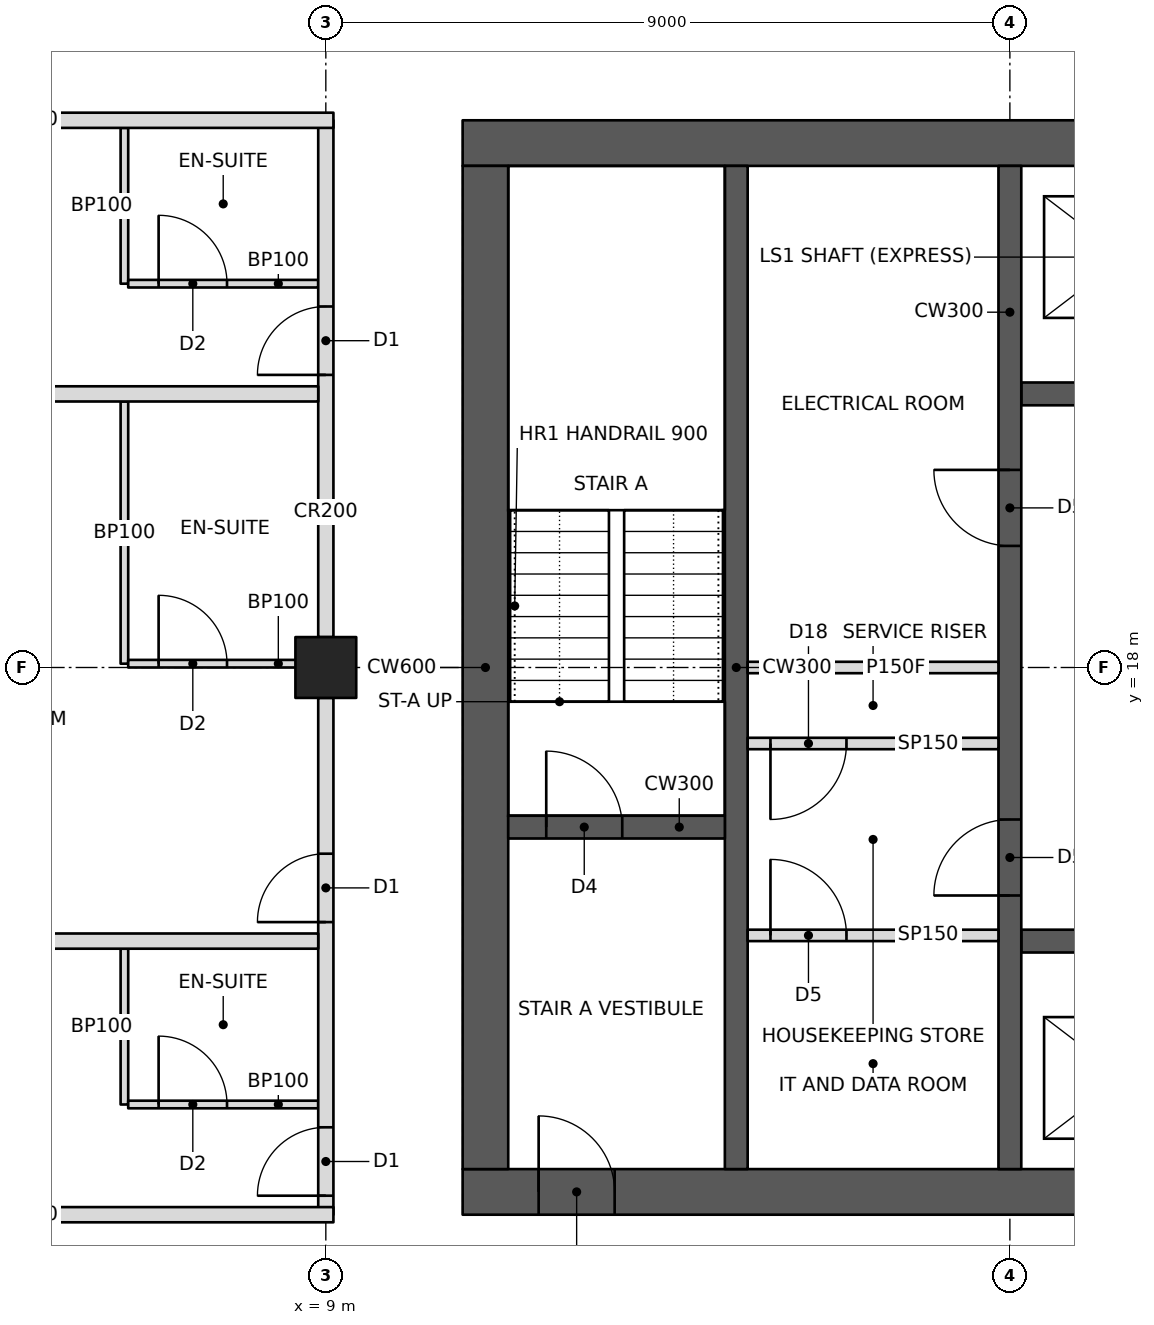
"""IFC4 building model, lengths in metres.
Left out: names, types, materials, properties, quantities, classifications, styles, units other than length and angle.
Written with IfcOpenShell. Run it as: python <this file> out.ifc"""

import sys

from ifc_helpers import new_model, si_unit, direction, frame, frame_2d, origin, origin_2d, place, context, subcontext, project, spatial, rectangle, hollow_rectangle, extrude, element, fill, save


model = new_model("IFC4")
c1 = context("Model", 3, precision=1e-05, world=origin(), true_north=direction((0.0, 1.0)))
c2 = subcontext(c1, "Body", "Model", "MODEL_VIEW")
j1 = project(units=[si_unit("LENGTHUNIT", "METRE"), si_unit("PLANEANGLEUNIT", "RADIAN")], contexts=[c1])
p1 = place(None, origin())
s1 = spatial("IfcSite", under=j1, at=p1, CompositionType="ELEMENT")
p2 = place(p1, origin())
s2 = spatial("IfcBuilding", under=s1, at=p2, CompositionType="ELEMENT")
p3 = place(p2, frame((0.0, 0.0, 82.4)))
s3 = spatial("IfcBuildingStorey", under=s2, at=p3, CompositionType="ELEMENT", Elevation=82.4)
p4 = place(p3, frame((9.0, 18.0, 0.0), z_axis=(0.0, 0.0, 1.0), x_axis=(1.0, 0.0, 0.0)))
e1 = element("IfcColumn", 1, at=p4, inside=s3, PredefinedType="COLUMN", context=c2, shape_type="SweptSolid", body=[
    extrude(hollow_rectangle(XDim=0.8, YDim=0.8, WallThickness=0.09, at=origin_2d()), origin(), (0.0, 0.0, 1.0), 3.4),
])
p5 = place(p3, frame((10.8, 11.1, 0.0), z_axis=(0.0, 0.0, 1.0), x_axis=(1.0, 0.0, 0.0)))
e2 = element("IfcWall", 2, at=p5, inside=s3, PredefinedType="SHEAR", context=c2, shape_type="SweptSolid", body=[
    extrude(rectangle(XDim=23.4, YDim=0.6, at=frame_2d((11.7, 0.0))), origin(), (0.0, 0.0, 1.0), 3.4),
])
p6 = place(p5, frame((1.0, 0.0, 0.0)))
e3 = element("IfcOpeningElement", 3, at=p6, cuts=e2, PredefinedType="OPENING", context=c2, shape_type="SweptSolid", body=[
    extrude(rectangle(XDim=1.0, YDim=2.1, at=frame_2d((0.5, 1.05))), frame((0.0, 0.31, 0.0), z_axis=(0.0, -1.0, 0.0), x_axis=(1.0, 0.0, 0.0)), (0.0, 0.0, 1.0), 0.62),
])
p7 = place(p5, frame((17.2, 0.0, 0.0)))
e4 = element("IfcOpeningElement", 4, at=p7, cuts=e2, PredefinedType="OPENING", context=c2, shape_type="SweptSolid", body=[
    extrude(rectangle(XDim=1.8, YDim=2.1, at=frame_2d((0.9, 1.05))), frame((0.0, 0.31, 0.0), z_axis=(0.0, -1.0, 0.0), x_axis=(1.0, 0.0, 0.0)), (0.0, 0.0, 1.0), 0.62),
])
p8 = place(p3, frame((10.8, 24.9, 0.0), z_axis=(0.0, 0.0, 1.0), x_axis=(1.0, 0.0, 0.0)))
e5 = element("IfcWall", 5, at=p8, inside=s3, PredefinedType="SHEAR", context=c2, shape_type="SweptSolid", body=[
    extrude(rectangle(XDim=23.4, YDim=0.6, at=frame_2d((11.7, 0.0))), origin(), (0.0, 0.0, 1.0), 3.4),
])
p9 = place(p8, frame((17.2, 0.0, 0.0)))
e6 = element("IfcOpeningElement", 6, at=p9, cuts=e5, PredefinedType="OPENING", context=c2, shape_type="SweptSolid", body=[
    extrude(rectangle(XDim=1.8, YDim=2.1, at=frame_2d((0.9, 1.05))), frame((0.0, 0.31, 0.0), z_axis=(0.0, -1.0, 0.0), x_axis=(1.0, 0.0, 0.0)), (0.0, 0.0, 1.0), 0.62),
])
p10 = place(p8, frame((21.1, 0.0, 0.0)))
e7 = element("IfcOpeningElement", 7, at=p10, cuts=e5, PredefinedType="OPENING", context=c2, shape_type="SweptSolid", body=[
    extrude(rectangle(XDim=1.0, YDim=2.1, at=frame_2d((0.5, 1.05))), frame((0.0, 0.31, 0.0), z_axis=(0.0, -1.0, 0.0), x_axis=(1.0, 0.0, 0.0)), (0.0, 0.0, 1.0), 0.62),
])
p11 = place(p3, frame((11.1, 11.4, 0.0), z_axis=(0.0, 0.0, 1.0), x_axis=(0.0, 1.0, 0.0)))
e8 = element("IfcWall", 8, at=p11, inside=s3, PredefinedType="SHEAR", context=c2, shape_type="SweptSolid", body=[
    extrude(rectangle(XDim=13.2, YDim=0.6, at=frame_2d((6.6, 0.0))), origin(), (0.0, 0.0, 1.0), 3.4),
])
p12 = place(p3, frame((14.4, 11.4, 0.0), z_axis=(0.0, 0.0, 1.0), x_axis=(0.0, 1.0, 0.0)))
e9 = element("IfcWall", 9, at=p12, inside=s3, PredefinedType="SHEAR", context=c2, shape_type="SweptSolid", body=[
    extrude(rectangle(XDim=13.2, YDim=0.3, at=frame_2d((6.6, 0.0))), origin(), (0.0, 0.0, 1.0), 3.4),
])
p13 = place(p3, frame((11.4, 15.9, 0.0), z_axis=(0.0, 0.0, 1.0), x_axis=(1.0, 0.0, 0.0)))
e10 = element("IfcWall", 10, at=p13, inside=s3, PredefinedType="SHEAR", context=c2, shape_type="SweptSolid", body=[
    extrude(rectangle(XDim=2.85, YDim=0.3, at=frame_2d((1.425, 0.0))), origin(), (0.0, 0.0, 1.0), 3.4),
])
p14 = place(p13, frame((0.5, 0.0, 0.0)))
e11 = element("IfcOpeningElement", 11, at=p14, cuts=e10, PredefinedType="OPENING", context=c2, shape_type="SweptSolid", body=[
    extrude(rectangle(XDim=1.0, YDim=2.1, at=frame_2d((0.5, 1.05))), frame((0.0, 0.16, 0.0), z_axis=(0.0, -1.0, 0.0), x_axis=(1.0, 0.0, 0.0)), (0.0, 0.0, 1.0), 0.32),
])
p15 = place(p3, frame((18.0, 11.4, 0.0), z_axis=(0.0, 0.0, 1.0), x_axis=(0.0, 1.0, 0.0)))
e12 = element("IfcWall", 12, at=p15, inside=s3, PredefinedType="SHEAR", context=c2, shape_type="SweptSolid", body=[
    extrude(rectangle(XDim=13.2, YDim=0.3, at=frame_2d((6.6, 0.0))), origin(), (0.0, 0.0, 1.0), 3.4),
])
p16 = place(p15, frame((3.6, 0.0, 0.0)))
e13 = element("IfcOpeningElement", 13, at=p16, cuts=e12, PredefinedType="OPENING", context=c2, shape_type="SweptSolid", body=[
    extrude(rectangle(XDim=1.0, YDim=2.1, at=frame_2d((0.5, 1.05))), frame((0.0, 0.16, 0.0), z_axis=(0.0, -1.0, 0.0), x_axis=(1.0, 0.0, 0.0)), (0.0, 0.0, 1.0), 0.32),
])
p17 = place(p15, frame((8.2, 0.0, 0.0)))
e14 = element("IfcOpeningElement", 14, at=p17, cuts=e12, PredefinedType="OPENING", context=c2, shape_type="SweptSolid", body=[
    extrude(rectangle(XDim=1.0, YDim=2.1, at=frame_2d((0.5, 1.05))), frame((0.0, 0.16, 0.0), z_axis=(0.0, -1.0, 0.0), x_axis=(1.0, 0.0, 0.0)), (0.0, 0.0, 1.0), 0.32),
])
p18 = place(p3, frame((14.55, 18.0, 0.0), z_axis=(0.0, 0.0, 1.0), x_axis=(1.0, 0.0, 0.0)))
e15 = element("IfcWall", 15, at=p18, inside=s3, PredefinedType="PARTITIONING", context=c2, shape_type="SweptSolid", body=[
    extrude(rectangle(XDim=3.3, YDim=0.15, at=frame_2d((1.65, 0.0))), origin(), (0.0, 0.0, 1.0), 3.2),
])
p19 = place(p3, frame((18.15, 14.4, 0.0), z_axis=(0.0, 0.0, 1.0), x_axis=(1.0, 0.0, 0.0)))
e16 = element("IfcWall", 16, at=p19, inside=s3, PredefinedType="SHEAR", context=c2, shape_type="SweptSolid", body=[
    extrude(rectangle(XDim=9.0, YDim=0.3, at=frame_2d((4.5, 0.0))), origin(), (0.0, 0.0, 1.0), 3.4),
])
p20 = place(p19, frame((0.8, 0.0, 0.0)))
e17 = element("IfcOpeningElement", 17, at=p20, cuts=e16, PredefinedType="OPENING", context=c2, shape_type="SweptSolid", body=[
    extrude(rectangle(XDim=1.1, YDim=2.1, at=frame_2d((0.55, 1.05))), frame((0.0, 0.16, 0.0), z_axis=(0.0, -1.0, 0.0), x_axis=(1.0, 0.0, 0.0)), (0.0, 0.0, 1.0), 0.32),
])
p21 = place(p19, frame((3.8, 0.0, 0.0)))
e18 = element("IfcOpeningElement", 18, at=p21, cuts=e16, PredefinedType="OPENING", context=c2, shape_type="SweptSolid", body=[
    extrude(rectangle(XDim=1.1, YDim=2.1, at=frame_2d((0.55, 1.05))), frame((0.0, 0.16, 0.0), z_axis=(0.0, -1.0, 0.0), x_axis=(1.0, 0.0, 0.0)), (0.0, 0.0, 1.0), 0.32),
])
p22 = place(p19, frame((6.75, 0.0, 0.0)))
e19 = element("IfcOpeningElement", 19, at=p22, cuts=e16, PredefinedType="OPENING", context=c2, shape_type="SweptSolid", body=[
    extrude(rectangle(XDim=1.2, YDim=2.1, at=frame_2d((0.6, 1.05))), frame((0.0, 0.16, 0.0), z_axis=(0.0, -1.0, 0.0), x_axis=(1.0, 0.0, 0.0)), (0.0, 0.0, 1.0), 0.32),
])
p23 = place(p3, frame((18.15, 21.6, 0.0), z_axis=(0.0, 0.0, 1.0), x_axis=(1.0, 0.0, 0.0)))
e20 = element("IfcWall", 20, at=p23, inside=s3, PredefinedType="SHEAR", context=c2, shape_type="SweptSolid", body=[
    extrude(rectangle(XDim=9.0, YDim=0.3, at=frame_2d((4.5, 0.0))), origin(), (0.0, 0.0, 1.0), 3.4),
])
p24 = place(p23, frame((6.75, 0.0, 0.0)))
e21 = element("IfcOpeningElement", 21, at=p24, cuts=e20, PredefinedType="OPENING", context=c2, shape_type="SweptSolid", body=[
    extrude(rectangle(XDim=1.2, YDim=2.1, at=frame_2d((0.6, 1.05))), frame((0.0, 0.16, 0.0), z_axis=(0.0, -1.0, 0.0), x_axis=(1.0, 0.0, 0.0)), (0.0, 0.0, 1.0), 0.32),
])
p25 = place(p3, frame((9.0, 10.8, 0.0), z_axis=(0.0, 0.0, 1.0), x_axis=(0.0, 1.0, 0.0)))
e22 = element("IfcWall", 22, at=p25, inside=s3, PredefinedType="PARTITIONING", context=c2, shape_type="SweptSolid", body=[
    extrude(rectangle(XDim=6.8, YDim=0.2, at=frame_2d((3.4, 0.0))), origin(), (0.0, 0.0, 1.0), 2.405),
])
p26 = place(p25, frame((0.25, 0.0, 0.0)))
e23 = element("IfcOpeningElement", 23, at=p26, cuts=e22, PredefinedType="OPENING", context=c2, shape_type="SweptSolid", body=[
    extrude(rectangle(XDim=0.9, YDim=2.1, at=frame_2d((0.45, 1.05))), frame((0.0, 0.11, 0.0), z_axis=(0.0, -1.0, 0.0), x_axis=(1.0, 0.0, 0.0)), (0.0, 0.0, 1.0), 0.22),
])
p27 = place(p25, frame((3.85, 0.0, 0.0)))
e24 = element("IfcOpeningElement", 24, at=p27, cuts=e22, PredefinedType="OPENING", context=c2, shape_type="SweptSolid", body=[
    extrude(rectangle(XDim=0.9, YDim=2.1, at=frame_2d((0.45, 1.05))), frame((0.0, 0.11, 0.0), z_axis=(0.0, -1.0, 0.0), x_axis=(1.0, 0.0, 0.0)), (0.0, 0.0, 1.0), 0.22),
])
p28 = place(p3, frame((9.0, 18.4, 0.0), z_axis=(0.0, 0.0, 1.0), x_axis=(0.0, 1.0, 0.0)))
e25 = element("IfcWall", 25, at=p28, inside=s3, PredefinedType="PARTITIONING", context=c2, shape_type="SweptSolid", body=[
    extrude(rectangle(XDim=6.8, YDim=0.2, at=frame_2d((3.4, 0.0))), origin(), (0.0, 0.0, 1.0), 2.405),
])
p29 = place(p28, frame((3.45, 0.0, 0.0)))
e26 = element("IfcOpeningElement", 26, at=p29, cuts=e25, PredefinedType="OPENING", context=c2, shape_type="SweptSolid", body=[
    extrude(rectangle(XDim=0.9, YDim=2.1, at=frame_2d((0.45, 1.05))), frame((0.0, 0.11, 0.0), z_axis=(0.0, -1.0, 0.0), x_axis=(1.0, 0.0, 0.0)), (0.0, 0.0, 1.0), 0.22),
])
for number, where, z_axis, x_axis in (
    (27, (1.0, 10.8, 0.0), (0.0, 0.0, 1.0), (1.0, 0.0, 0.0)),
    (28, (1.0, 25.2, 0.0), (0.0, 0.0, 1.0), (1.0, 0.0, 0.0)),
):
    element("IfcWall", number, at=place(p3, frame(where, z_axis=z_axis, x_axis=x_axis)), inside=s3, PredefinedType="PARTITIONING", context=c2, shape_type="SweptSolid", body=[
        extrude(rectangle(XDim=8.1, YDim=0.2, at=frame_2d((4.05, 0.0))), origin(), (0.0, 0.0, 1.0), 2.404),
    ])
for number, where, z_axis, x_axis in (
    (29, (8.9, 14.4, 0.0), (0.0, 0.0, 1.0), (-1.0, 0.0, 0.0)),
    (30, (8.9, 21.6, 0.0), (0.0, 0.0, 1.0), (-1.0, 0.0, 0.0)),
):
    element("IfcWall", number, at=place(p3, frame(where, z_axis=z_axis, x_axis=x_axis)), inside=s3, PredefinedType="PARTITIONING", context=c2, shape_type="SweptSolid", body=[
        extrude(rectangle(XDim=7.9, YDim=0.2, at=frame_2d((3.95, 0.0))), origin(), (0.0, 0.0, 1.0), 2.404),
    ])
p30 = place(p3, frame((6.35, 12.25, 0.0), z_axis=(0.0, 0.0, 1.0), x_axis=(0.0, 1.0, 0.0)))
e31 = element("IfcWall", 31, at=p30, inside=s3, PredefinedType="PARTITIONING", context=c2, shape_type="SweptSolid", body=[
    extrude(rectangle(XDim=2.05, YDim=0.1, at=frame_2d((1.025, 0.0))), origin(), (0.0, 0.0, 1.0), 3.2),
])
p31 = place(p3, frame((8.9, 12.25, 0.0), z_axis=(0.0, 0.0, 1.0), x_axis=(-1.0, 0.0, 0.0)))
e32 = element("IfcWall", 32, at=p31, inside=s3, PredefinedType="PARTITIONING", context=c2, shape_type="SweptSolid", body=[
    extrude(rectangle(XDim=2.5, YDim=0.1, at=frame_2d((1.25, 0.0))), origin(), (0.0, 0.0, 1.0), 2.404),
])
p32 = place(p31, frame((1.2, 0.0, 0.0)))
e33 = element("IfcOpeningElement", 33, at=p32, cuts=e32, PredefinedType="OPENING", context=c2, shape_type="SweptSolid", body=[
    extrude(rectangle(XDim=0.9, YDim=2.1, at=frame_2d((0.45, 1.05))), frame((0.0, 0.06, 0.0), z_axis=(0.0, -1.0, 0.0), x_axis=(1.0, 0.0, 0.0)), (0.0, 0.0, 1.0), 0.12),
])
p33 = place(p3, frame((6.35, 18.05, 0.0), z_axis=(0.0, 0.0, 1.0), x_axis=(0.0, 1.0, 0.0)))
e34 = element("IfcWall", 34, at=p33, inside=s3, PredefinedType="PARTITIONING", context=c2, shape_type="SweptSolid", body=[
    extrude(rectangle(XDim=3.45, YDim=0.1, at=frame_2d((1.725, 0.0))), origin(), (0.0, 0.0, 1.0), 2.404),
])
p34 = place(p3, frame((8.9, 18.05, 0.0), z_axis=(0.0, 0.0, 1.0), x_axis=(-1.0, 0.0, 0.0)))
e35 = element("IfcWall", 35, at=p34, inside=s3, PredefinedType="PARTITIONING", context=c2, shape_type="SweptSolid", body=[
    extrude(rectangle(XDim=2.5, YDim=0.1, at=frame_2d((1.25, 0.0))), origin(), (0.0, 0.0, 1.0), 2.405),
])
p35 = place(p34, frame((1.2, 0.0, 0.0)))
e36 = element("IfcOpeningElement", 36, at=p35, cuts=e35, PredefinedType="OPENING", context=c2, shape_type="SweptSolid", body=[
    extrude(rectangle(XDim=0.9, YDim=2.1, at=frame_2d((0.45, 1.05))), frame((0.0, 0.06, 0.0), z_axis=(0.0, -1.0, 0.0), x_axis=(1.0, 0.0, 0.0)), (0.0, 0.0, 1.0), 0.12),
])
p36 = place(p3, frame((6.35, 23.05, 0.0), z_axis=(0.0, 0.0, 1.0), x_axis=(0.0, 1.0, 0.0)))
e37 = element("IfcWall", 37, at=p36, inside=s3, PredefinedType="PARTITIONING", context=c2, shape_type="SweptSolid", body=[
    extrude(rectangle(XDim=2.05, YDim=0.1, at=frame_2d((1.025, 0.0))), origin(), (0.0, 0.0, 1.0), 3.2),
])
p37 = place(p3, frame((8.9, 23.05, 0.0), z_axis=(0.0, 0.0, 1.0), x_axis=(-1.0, 0.0, 0.0)))
e38 = element("IfcWall", 38, at=p37, inside=s3, PredefinedType="PARTITIONING", context=c2, shape_type="SweptSolid", body=[
    extrude(rectangle(XDim=2.5, YDim=0.1, at=frame_2d((1.25, 0.0))), origin(), (0.0, 0.0, 1.0), 2.404),
])
p38 = place(p37, frame((1.2, 0.0, 0.0)))
e39 = element("IfcOpeningElement", 39, at=p38, cuts=e38, PredefinedType="OPENING", context=c2, shape_type="SweptSolid", body=[
    extrude(rectangle(XDim=0.9, YDim=2.1, at=frame_2d((0.45, 1.05))), frame((0.0, 0.06, 0.0), z_axis=(0.0, -1.0, 0.0), x_axis=(1.0, 0.0, 0.0)), (0.0, 0.0, 1.0), 0.12),
])
p39 = place(p3, frame((14.55, 17.0, 0.0), z_axis=(0.0, 0.0, 1.0), x_axis=(1.0, 0.0, 0.0)))
e40 = element("IfcWall", 40, at=p39, inside=s3, PredefinedType="PARTITIONING", context=c2, shape_type="SweptSolid", body=[
    extrude(rectangle(XDim=3.3, YDim=0.15, at=frame_2d((1.65, 0.0))), origin(), (0.0, 0.0, 1.0), 3.2),
])
p40 = place(p39, frame((0.3, 0.0, 0.0)))
e41 = element("IfcOpeningElement", 41, at=p40, cuts=e40, PredefinedType="OPENING", context=c2, shape_type="SweptSolid", body=[
    extrude(rectangle(XDim=1.0, YDim=2.1, at=frame_2d((0.5, 1.05))), frame((0.0, 0.085, 0.0), z_axis=(0.0, -1.0, 0.0), x_axis=(1.0, 0.0, 0.0)), (0.0, 0.0, 1.0), 0.17),
])
p41 = place(p3, frame((14.55, 14.475, 0.0), z_axis=(0.0, 0.0, 1.0), x_axis=(1.0, 0.0, 0.0)))
e42 = element("IfcWall", 42, at=p41, inside=s3, PredefinedType="PARTITIONING", context=c2, shape_type="SweptSolid", body=[
    extrude(rectangle(XDim=3.3, YDim=0.15, at=frame_2d((1.65, 0.0))), origin(), (0.0, 0.0, 1.0), 3.2),
])
p42 = place(p41, frame((0.3, 0.0, 0.0)))
e43 = element("IfcOpeningElement", 43, at=p42, cuts=e42, PredefinedType="OPENING", context=c2, shape_type="SweptSolid", body=[
    extrude(rectangle(XDim=1.0, YDim=2.1, at=frame_2d((0.5, 1.05))), frame((0.0, 0.085, 0.0), z_axis=(0.0, -1.0, 0.0), x_axis=(1.0, 0.0, 0.0)), (0.0, 0.0, 1.0), 0.17),
])
p43 = place(p32, frame((0.9, 0.0, 0.0), z_axis=(0.0, 0.0, 1.0), x_axis=(-1.0, 0.0, 0.0)))
e44 = element("IfcDoor", 44, at=p43, inside=s3, OperationType="SINGLE_SWING_LEFT", PredefinedType="DOOR", context=c2, shape_type="SweptSolid", body=[
    extrude(rectangle(XDim=0.9, YDim=2.1, at=frame_2d((0.45, 1.05))), frame((0.0, 0.025, 0.0), z_axis=(0.0, -1.0, 0.0), x_axis=(1.0, 0.0, 0.0)), (0.0, 0.0, 1.0), 0.05),
])
fill(e33, e44)
p44 = place(p26, origin())
e45 = element("IfcDoor", 45, at=p44, inside=s3, OperationType="SINGLE_SWING_LEFT", PredefinedType="DOOR", context=c2, shape_type="SweptSolid", body=[
    extrude(rectangle(XDim=0.9, YDim=2.1, at=frame_2d((0.45, 1.05))), frame((0.0, 0.025, 0.0), z_axis=(0.0, -1.0, 0.0), x_axis=(1.0, 0.0, 0.0)), (0.0, 0.0, 1.0), 0.05),
])
fill(e23, e45)
p45 = place(p35, frame((0.9, 0.0, 0.0), z_axis=(0.0, 0.0, 1.0), x_axis=(-1.0, 0.0, 0.0)))
e46 = element("IfcDoor", 46, at=p45, inside=s3, OperationType="SINGLE_SWING_LEFT", PredefinedType="DOOR", context=c2, shape_type="SweptSolid", body=[
    extrude(rectangle(XDim=0.9, YDim=2.1, at=frame_2d((0.45, 1.05))), frame((0.0, 0.025, 0.0), z_axis=(0.0, -1.0, 0.0), x_axis=(1.0, 0.0, 0.0)), (0.0, 0.0, 1.0), 0.05),
])
fill(e36, e46)
p46 = place(p27, origin())
e47 = element("IfcDoor", 47, at=p46, inside=s3, OperationType="SINGLE_SWING_LEFT", PredefinedType="DOOR", context=c2, shape_type="SweptSolid", body=[
    extrude(rectangle(XDim=0.9, YDim=2.1, at=frame_2d((0.45, 1.05))), frame((0.0, 0.025, 0.0), z_axis=(0.0, -1.0, 0.0), x_axis=(1.0, 0.0, 0.0)), (0.0, 0.0, 1.0), 0.05),
])
fill(e24, e47)
p47 = place(p38, frame((0.9, 0.0, 0.0), z_axis=(0.0, 0.0, 1.0), x_axis=(-1.0, 0.0, 0.0)))
e48 = element("IfcDoor", 48, at=p47, inside=s3, OperationType="SINGLE_SWING_LEFT", PredefinedType="DOOR", context=c2, shape_type="SweptSolid", body=[
    extrude(rectangle(XDim=0.9, YDim=2.1, at=frame_2d((0.45, 1.05))), frame((0.0, 0.025, 0.0), z_axis=(0.0, -1.0, 0.0), x_axis=(1.0, 0.0, 0.0)), (0.0, 0.0, 1.0), 0.05),
])
fill(e39, e48)
p48 = place(p29, origin())
e49 = element("IfcDoor", 49, at=p48, inside=s3, OperationType="SINGLE_SWING_LEFT", PredefinedType="DOOR", context=c2, shape_type="SweptSolid", body=[
    extrude(rectangle(XDim=0.9, YDim=2.1, at=frame_2d((0.45, 1.05))), frame((0.0, 0.025, 0.0), z_axis=(0.0, -1.0, 0.0), x_axis=(1.0, 0.0, 0.0)), (0.0, 0.0, 1.0), 0.05),
])
fill(e26, e49)
p49 = place(p40, frame((1.0, 0.0, 0.0), z_axis=(0.0, 0.0, 1.0), x_axis=(-1.0, 0.0, 0.0)))
e50 = element("IfcDoor", 50, at=p49, inside=s3, OperationType="SINGLE_SWING_RIGHT", PredefinedType="DOOR", context=c2, shape_type="SweptSolid", body=[
    extrude(rectangle(XDim=1.0, YDim=2.1, at=frame_2d((0.5, 1.05))), frame((0.0, 0.025, 0.0), z_axis=(0.0, -1.0, 0.0), x_axis=(1.0, 0.0, 0.0)), (0.0, 0.0, 1.0), 0.05),
])
fill(e41, e50)
p50 = place(p42, origin())
e51 = element("IfcDoor", 51, at=p50, inside=s3, OperationType="SINGLE_SWING_LEFT", PredefinedType="DOOR", context=c2, shape_type="SweptSolid", body=[
    extrude(rectangle(XDim=1.0, YDim=2.1, at=frame_2d((0.5, 1.05))), frame((0.0, 0.025, 0.0), z_axis=(0.0, -1.0, 0.0), x_axis=(1.0, 0.0, 0.0)), (0.0, 0.0, 1.0), 0.05),
])
fill(e43, e51)
p51 = place(p6, origin())
e52 = element("IfcDoor", 52, at=p51, inside=s3, OperationType="SINGLE_SWING_LEFT", PredefinedType="DOOR", context=c2, shape_type="SweptSolid", body=[
    extrude(rectangle(XDim=1.0, YDim=2.1, at=frame_2d((0.5, 1.05))), frame((0.0, 0.025, 0.0), z_axis=(0.0, -1.0, 0.0), x_axis=(1.0, 0.0, 0.0)), (0.0, 0.0, 1.0), 0.05),
])
fill(e3, e52)
p52 = place(p14, origin())
e53 = element("IfcDoor", 53, at=p52, inside=s3, OperationType="SINGLE_SWING_LEFT", PredefinedType="DOOR", context=c2, shape_type="SweptSolid", body=[
    extrude(rectangle(XDim=1.0, YDim=2.1, at=frame_2d((0.5, 1.05))), frame((0.0, 0.025, 0.0), z_axis=(0.0, -1.0, 0.0), x_axis=(1.0, 0.0, 0.0)), (0.0, 0.0, 1.0), 0.05),
])
fill(e11, e53)
p53 = place(p16, origin())
e54 = element("IfcDoor", 54, at=p53, inside=s3, OperationType="SINGLE_SWING_LEFT", PredefinedType="DOOR", context=c2, shape_type="SweptSolid", body=[
    extrude(rectangle(XDim=1.0, YDim=2.1, at=frame_2d((0.5, 1.05))), frame((0.0, 0.025, 0.0), z_axis=(0.0, -1.0, 0.0), x_axis=(1.0, 0.0, 0.0)), (0.0, 0.0, 1.0), 0.05),
])
fill(e13, e54)
p54 = place(p17, origin())
e55 = element("IfcDoor", 55, at=p54, inside=s3, OperationType="SINGLE_SWING_RIGHT", PredefinedType="DOOR", context=c2, shape_type="SweptSolid", body=[
    extrude(rectangle(XDim=1.0, YDim=2.1, at=frame_2d((0.5, 1.05))), frame((0.0, 0.025, 0.0), z_axis=(0.0, -1.0, 0.0), x_axis=(1.0, 0.0, 0.0)), (0.0, 0.0, 1.0), 0.05),
])
fill(e14, e55)
save(model, sys.argv[1])
